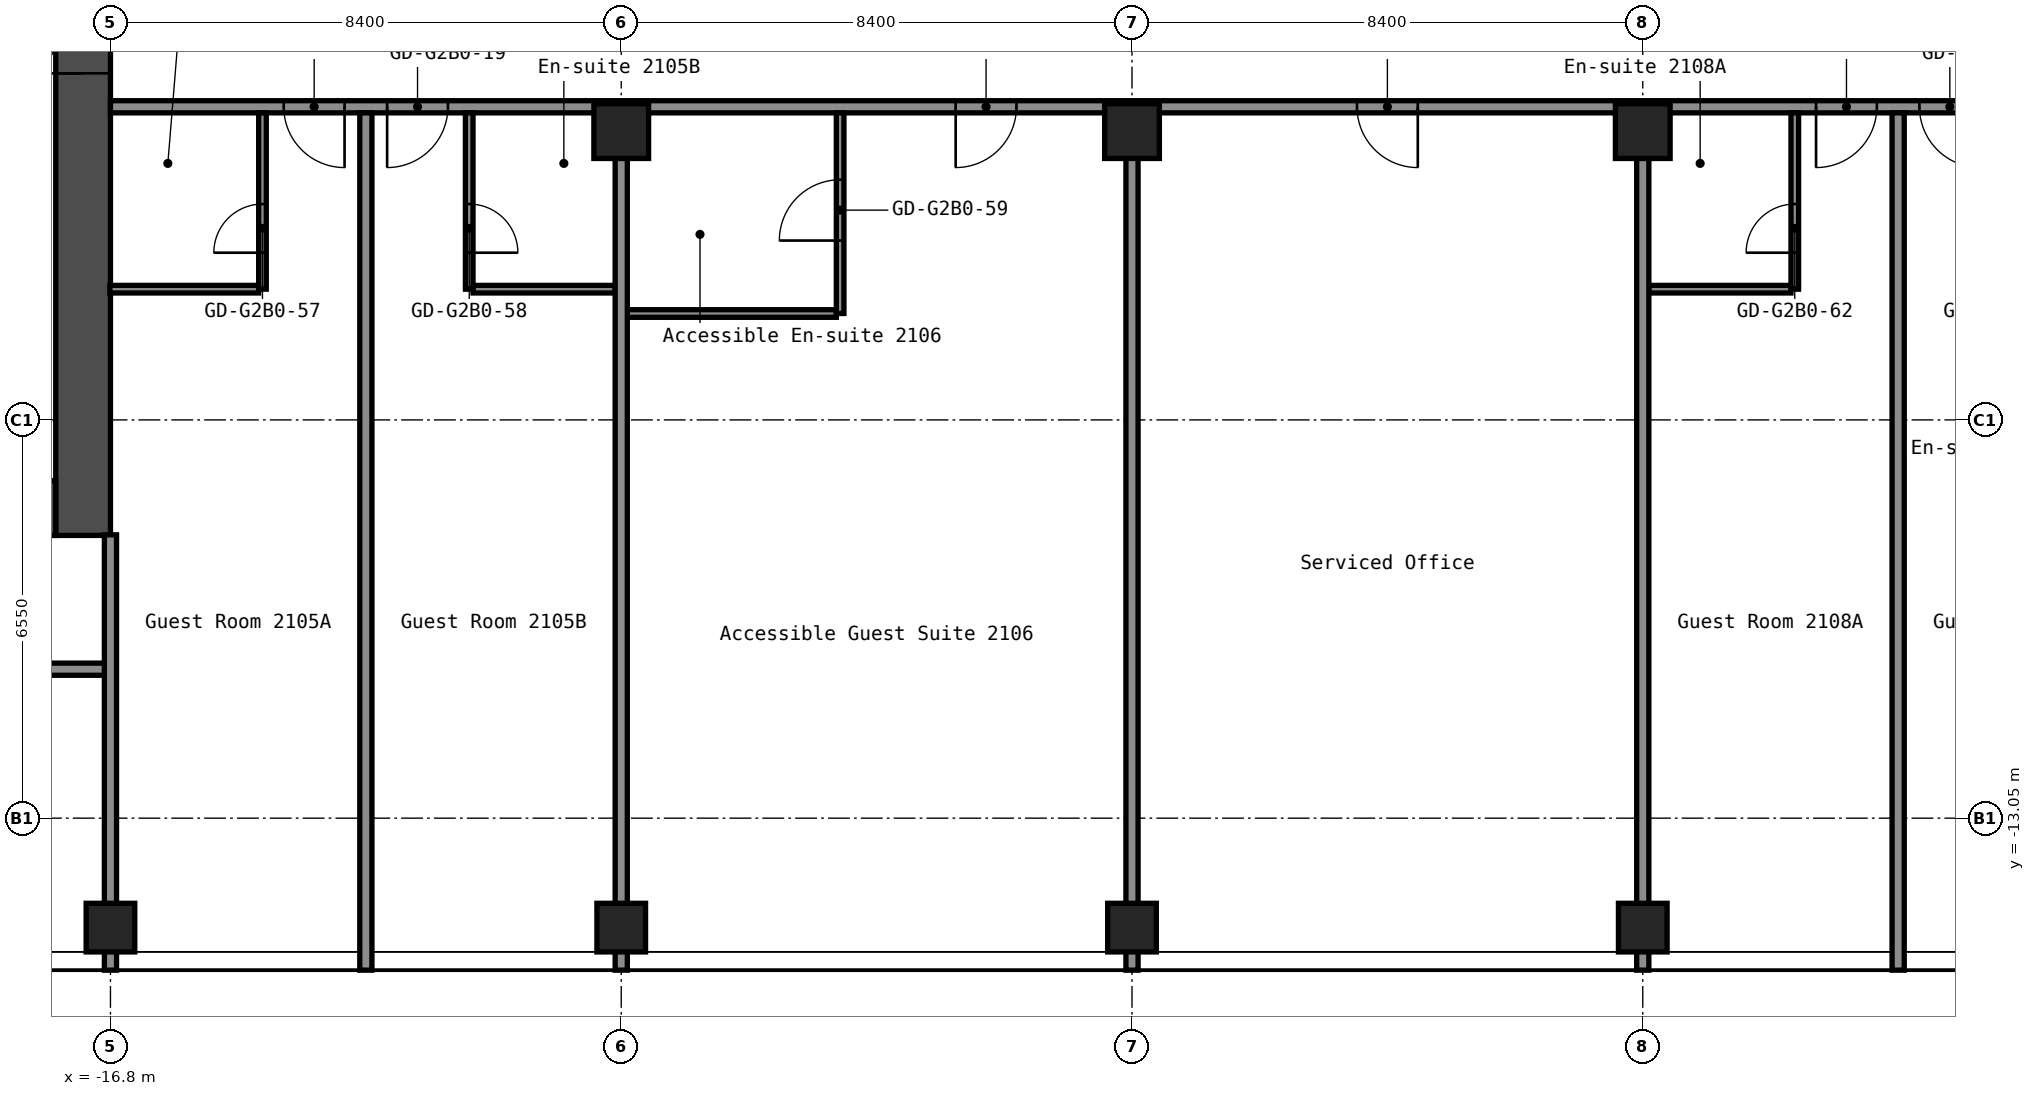
"""IFC4 building model, lengths in metres.
Left out: names, types, materials, properties, quantities, classifications, styles, units other than length and angle.
Written with IfcOpenShell. Run it as: python <this file> out.ifc"""

import sys

from ifc_helpers import new_model, si_unit, direction, frame, frame_2d, origin, origin_2d, place, context, subcontext, project, spatial, rectangle, hollow_rectangle, extrude, element, fill, save


model = new_model("IFC4")
c1 = context("Model", 3, precision=1e-05, world=origin(), true_north=direction((0.0, 1.0)))
c2 = subcontext(c1, "Body", "Model", "MODEL_VIEW")
j1 = project(units=[si_unit("LENGTHUNIT", "METRE"), si_unit("PLANEANGLEUNIT", "RADIAN")], contexts=[c1])
p1 = place(None, origin())
s1 = spatial("IfcSite", under=j1, at=p1, CompositionType="ELEMENT")
p2 = place(p1, origin())
s2 = spatial("IfcBuilding", under=s1, at=p2, CompositionType="ELEMENT")
p3 = place(p2, frame((0.0, 0.0, 78.6)))
s3 = spatial("IfcBuildingStorey", under=s2, at=p3, CompositionType="ELEMENT", Elevation=78.6)
for number, where, z_axis, x_axis in (
    (1, (-16.8, -14.85, 0.0), (0.0, 0.0, 1.0), (1.0, 0.0, 0.0)),
    (2, (-8.4, -14.85, 0.0), (0.0, 0.0, 1.0), (1.0, 0.0, 0.0)),
):
    element("IfcColumn", number, at=place(p3, frame(where, z_axis=z_axis, x_axis=x_axis)), inside=s3, PredefinedType="COLUMN", context=c2, shape_type="SweptSolid", body=[
        extrude(hollow_rectangle(XDim=0.8, YDim=0.8, WallThickness=0.032, at=origin_2d()), origin(), (0.0, 0.0, 1.0), 2.8),
    ])
p4 = place(p3, frame((-8.4, -1.75, 0.0), z_axis=(0.0, 0.0, 1.0), x_axis=(1.0, 0.0, 0.0)))
e3 = element("IfcColumn", 3, at=p4, inside=s3, PredefinedType="COLUMN", context=c2, shape_type="SweptSolid", body=[
    extrude(hollow_rectangle(XDim=0.9, YDim=0.9, WallThickness=0.036, at=origin_2d()), origin(), (0.0, 0.0, 1.0), 2.8),
])
p5 = place(p3, frame((0.0, -14.85, 0.0), z_axis=(0.0, 0.0, 1.0), x_axis=(1.0, 0.0, 0.0)))
e4 = element("IfcColumn", 4, at=p5, inside=s3, PredefinedType="COLUMN", context=c2, shape_type="SweptSolid", body=[
    extrude(hollow_rectangle(XDim=0.8, YDim=0.8, WallThickness=0.032, at=origin_2d()), origin(), (0.0, 0.0, 1.0), 2.8),
])
p6 = place(p3, frame((0.0, -1.75, 0.0), z_axis=(0.0, 0.0, 1.0), x_axis=(1.0, 0.0, 0.0)))
e5 = element("IfcColumn", 5, at=p6, inside=s3, PredefinedType="COLUMN", context=c2, shape_type="SweptSolid", body=[
    extrude(hollow_rectangle(XDim=0.9, YDim=0.9, WallThickness=0.036, at=origin_2d()), origin(), (0.0, 0.0, 1.0), 2.8),
])
p7 = place(p3, frame((8.4, -14.85, 0.0), z_axis=(0.0, 0.0, 1.0), x_axis=(1.0, 0.0, 0.0)))
e6 = element("IfcColumn", 6, at=p7, inside=s3, PredefinedType="COLUMN", context=c2, shape_type="SweptSolid", body=[
    extrude(hollow_rectangle(XDim=0.8, YDim=0.8, WallThickness=0.032, at=origin_2d()), origin(), (0.0, 0.0, 1.0), 2.8),
])
p8 = place(p3, frame((8.4, -1.75, 0.0), z_axis=(0.0, 0.0, 1.0), x_axis=(1.0, 0.0, 0.0)))
e7 = element("IfcColumn", 7, at=p8, inside=s3, PredefinedType="COLUMN", context=c2, shape_type="SweptSolid", body=[
    extrude(hollow_rectangle(XDim=0.9, YDim=0.9, WallThickness=0.036, at=origin_2d()), origin(), (0.0, 0.0, 1.0), 2.8),
])
p9 = place(p3, frame((-17.25, -8.4, 0.0), z_axis=(0.0, 0.0, 1.0), x_axis=(0.0, 1.0, 0.0)))
e8 = element("IfcWall", 8, at=p9, inside=s3, PredefinedType="SHEAR", context=c2, shape_type="SweptSolid", body=[
    extrude(rectangle(XDim=16.8, YDim=0.9, at=frame_2d((8.4, 0.0))), origin(), (0.0, 0.0, 1.0), 2.8),
])
p10 = place(p9, frame((7.6, 0.0, 0.0)))
e9 = element("IfcOpeningElement", 9, at=p10, cuts=e8, PredefinedType="OPENING", context=c2, shape_type="SweptSolid", body=[
    extrude(rectangle(XDim=1.2, YDim=2.1, at=frame_2d((0.6, 1.05))), frame((0.0, 0.46, 0.0), z_axis=(0.0, -1.0, 0.0), x_axis=(1.0, 0.0, 0.0)), (0.0, 0.0, 1.0), 0.92),
])
p11 = place(p3, frame((-32.7, -7.95, 0.0), z_axis=(0.0, 0.0, 1.0), x_axis=(1.0, 0.0, 0.0)))
e10 = element("IfcWall", 10, at=p11, inside=s3, PredefinedType="SHEAR", context=c2, shape_type="SweptSolid", body=[
    extrude(rectangle(XDim=15.0, YDim=0.9, at=frame_2d((7.5, 0.0))), origin(), (0.0, 0.0, 1.0), 2.8),
])
p12 = place(p11, frame((11.45, 0.0, 0.0)))
e11 = element("IfcOpeningElement", 11, at=p12, cuts=e10, PredefinedType="OPENING", context=c2, shape_type="SweptSolid", body=[
    extrude(rectangle(XDim=1.0, YDim=2.1, at=frame_2d((0.5, 1.05))), frame((0.0, 0.46, 0.0), z_axis=(0.0, -1.0, 0.0), x_axis=(1.0, 0.0, 0.0)), (0.0, 0.0, 1.0), 0.92),
])
p13 = place(p3, frame((-46.5, -10.6, 0.0), z_axis=(0.0, 0.0, 1.0), x_axis=(1.0, 0.0, 0.0)))
e12 = element("IfcWall", 12, at=p13, inside=s3, PredefinedType="PARTITIONING", context=c2, shape_type="SweptSolid", body=[
    extrude(rectangle(XDim=29.7, YDim=0.2, at=frame_2d((14.85, 0.0))), origin(), (0.0, 0.0, 1.0), 2.8),
])
p14 = place(p13, frame((1.95, 0.0, 0.0)))
e13 = element("IfcOpeningElement", 13, at=p14, cuts=e12, PredefinedType="OPENING", context=c2, shape_type="SweptSolid", body=[
    extrude(rectangle(XDim=0.9, YDim=2.1, at=frame_2d((0.45, 1.05))), frame((0.0, 0.11, 0.0), z_axis=(0.0, -1.0, 0.0), x_axis=(1.0, 0.0, 0.0)), (0.0, 0.0, 1.0), 0.22),
])
p15 = place(p13, frame((6.57, 0.0, 0.0)))
e14 = element("IfcOpeningElement", 14, at=p15, cuts=e12, PredefinedType="OPENING", context=c2, shape_type="SweptSolid", body=[
    extrude(rectangle(XDim=0.9, YDim=2.1, at=frame_2d((0.45, 1.05))), frame((0.0, 0.11, 0.0), z_axis=(0.0, -1.0, 0.0), x_axis=(1.0, 0.0, 0.0)), (0.0, 0.0, 1.0), 0.22),
])
p16 = place(p13, frame((10.77, 0.0, 0.0)))
e15 = element("IfcOpeningElement", 15, at=p16, cuts=e12, PredefinedType="OPENING", context=c2, shape_type="SweptSolid", body=[
    extrude(rectangle(XDim=0.9, YDim=2.1, at=frame_2d((0.45, 1.05))), frame((0.0, 0.11, 0.0), z_axis=(0.0, -1.0, 0.0), x_axis=(1.0, 0.0, 0.0)), (0.0, 0.0, 1.0), 0.22),
])
p17 = place(p13, frame((14.72, 0.0, 0.0)))
e16 = element("IfcOpeningElement", 16, at=p17, cuts=e12, PredefinedType="OPENING", context=c2, shape_type="SweptSolid", body=[
    extrude(rectangle(XDim=0.9, YDim=2.1, at=frame_2d((0.45, 1.05))), frame((0.0, 0.11, 0.0), z_axis=(0.0, -1.0, 0.0), x_axis=(1.0, 0.0, 0.0)), (0.0, 0.0, 1.0), 0.22),
])
p18 = place(p13, frame((18.92, 0.0, 0.0)))
e17 = element("IfcOpeningElement", 17, at=p18, cuts=e12, PredefinedType="OPENING", context=c2, shape_type="SweptSolid", body=[
    extrude(rectangle(XDim=0.9, YDim=2.1, at=frame_2d((0.45, 1.05))), frame((0.0, 0.11, 0.0), z_axis=(0.0, -1.0, 0.0), x_axis=(1.0, 0.0, 0.0)), (0.0, 0.0, 1.0), 0.22),
])
p19 = place(p13, frame((25.0, 0.0, 0.0)))
e18 = element("IfcOpeningElement", 18, at=p19, cuts=e12, PredefinedType="OPENING", context=c2, shape_type="SweptSolid", body=[
    extrude(rectangle(XDim=1.0, YDim=2.1, at=frame_2d((0.5, 1.05))), frame((0.0, 0.11, 0.0), z_axis=(0.0, -1.0, 0.0), x_axis=(1.0, 0.0, 0.0)), (0.0, 0.0, 1.0), 0.22),
])
p20 = place(p3, frame((-8.3, -4.75, 0.0), z_axis=(0.0, 0.0, 1.0), x_axis=(1.0, 0.0, 0.0)))
e19 = element("IfcWall", 19, at=p20, inside=s3, PredefinedType="PARTITIONING", context=c2, shape_type="SweptSolid", body=[
    extrude(rectangle(XDim=3.438, YDim=0.125, at=frame_2d((1.719, 0.0))), origin(), (0.0, 0.0, 1.0), 2.8),
])
p21 = place(p3, frame((-16.81, -4.35, 0.0), z_axis=(0.0, 0.0, 1.0), x_axis=(1.0, 0.0, 0.0)))
e20 = element("IfcWall", 20, at=p21, inside=s3, PredefinedType="PARTITIONING", context=c2, shape_type="SweptSolid", body=[
    extrude(rectangle(XDim=2.448, YDim=0.125, at=frame_2d((1.224, 0.0))), origin(), (0.0, 0.0, 1.0), 2.8),
])
for number, where, z_axis, x_axis in (
    (21, (-10.837, -4.35, 0.0), (0.0, 0.0, 1.0), (1.0, 0.0, 0.0)),
    (22, (8.5, -4.35, 0.0), (0.0, 0.0, 1.0), (1.0, 0.0, 0.0)),
):
    element("IfcWall", number, at=place(p3, frame(where, z_axis=z_axis, x_axis=x_axis)), inside=s3, PredefinedType="PARTITIONING", context=c2, shape_type="SweptSolid", body=[
        extrude(rectangle(XDim=2.337, YDim=0.125, at=frame_2d((1.169, 0.0))), origin(), (0.0, 0.0, 1.0), 2.8),
    ])
p22 = place(p3, frame((-16.8, -1.35, 0.0), z_axis=(0.0, 0.0, 1.0), x_axis=(1.0, 0.0, 0.0)))
e23 = element("IfcWall", 23, at=p22, inside=s3, PredefinedType="PARTITIONING", context=c2, shape_type="SweptSolid", body=[
    extrude(rectangle(XDim=33.6, YDim=0.2, at=frame_2d((16.8, 0.0))), origin(), (0.0, 0.0, 1.0), 2.8),
])
p23 = place(p22, frame((2.85, 0.0, 0.0)))
e24 = element("IfcOpeningElement", 24, at=p23, cuts=e23, PredefinedType="OPENING", context=c2, shape_type="SweptSolid", body=[
    extrude(rectangle(XDim=1.0, YDim=2.1, at=frame_2d((0.5, 1.05))), frame((0.0, 0.11, 0.0), z_axis=(0.0, -1.0, 0.0), x_axis=(1.0, 0.0, 0.0)), (0.0, 0.0, 1.0), 0.22),
])
p24 = place(p22, frame((4.55, 0.0, 0.0)))
e25 = element("IfcOpeningElement", 25, at=p24, cuts=e23, PredefinedType="OPENING", context=c2, shape_type="SweptSolid", body=[
    extrude(rectangle(XDim=1.0, YDim=2.1, at=frame_2d((0.5, 1.05))), frame((0.0, 0.11, 0.0), z_axis=(0.0, -1.0, 0.0), x_axis=(1.0, 0.0, 0.0)), (0.0, 0.0, 1.0), 0.22),
])
p25 = place(p22, frame((13.9, 0.0, 0.0)))
e26 = element("IfcOpeningElement", 26, at=p25, cuts=e23, PredefinedType="OPENING", context=c2, shape_type="SweptSolid", body=[
    extrude(rectangle(XDim=1.0, YDim=2.1, at=frame_2d((0.5, 1.05))), frame((0.0, 0.11, 0.0), z_axis=(0.0, -1.0, 0.0), x_axis=(1.0, 0.0, 0.0)), (0.0, 0.0, 1.0), 0.22),
])
p26 = place(p22, frame((20.5, 0.0, 0.0)))
e27 = element("IfcOpeningElement", 27, at=p26, cuts=e23, PredefinedType="OPENING", context=c2, shape_type="SweptSolid", body=[
    extrude(rectangle(XDim=1.0, YDim=2.1, at=frame_2d((0.5, 1.05))), frame((0.0, 0.11, 0.0), z_axis=(0.0, -1.0, 0.0), x_axis=(1.0, 0.0, 0.0)), (0.0, 0.0, 1.0), 0.22),
])
p27 = place(p22, frame((28.05, 0.0, 0.0)))
e28 = element("IfcOpeningElement", 28, at=p27, cuts=e23, PredefinedType="OPENING", context=c2, shape_type="SweptSolid", body=[
    extrude(rectangle(XDim=1.0, YDim=2.1, at=frame_2d((0.5, 1.05))), frame((0.0, 0.11, 0.0), z_axis=(0.0, -1.0, 0.0), x_axis=(1.0, 0.0, 0.0)), (0.0, 0.0, 1.0), 0.22),
])
p28 = place(p22, frame((29.75, 0.0, 0.0)))
e29 = element("IfcOpeningElement", 29, at=p28, cuts=e23, PredefinedType="OPENING", context=c2, shape_type="SweptSolid", body=[
    extrude(rectangle(XDim=1.0, YDim=2.1, at=frame_2d((0.5, 1.05))), frame((0.0, 0.11, 0.0), z_axis=(0.0, -1.0, 0.0), x_axis=(1.0, 0.0, 0.0)), (0.0, 0.0, 1.0), 0.22),
])
p29 = place(p3, frame((-16.8, -15.55, 0.0), z_axis=(0.0, 0.0, 1.0), x_axis=(0.0, 1.0, 0.0)))
e30 = element("IfcWall", 30, at=p29, inside=s3, PredefinedType="PARTITIONING", context=c2, shape_type="SweptSolid", body=[
    extrude(rectangle(XDim=7.16, YDim=0.2, at=frame_2d((3.58, 0.0))), origin(), (0.0, 0.0, 1.0), 2.8),
])
p30 = place(p3, frame((-14.3, -4.35, 0.0), z_axis=(0.0, 0.0, 1.0), x_axis=(0.0, 1.0, 0.0)))
e31 = element("IfcWall", 31, at=p30, inside=s3, PredefinedType="PARTITIONING", context=c2, shape_type="SweptSolid", body=[
    extrude(rectangle(XDim=2.9, YDim=0.125, at=frame_2d((1.45, 0.0))), origin(), (0.0, 0.0, 1.0), 2.8),
])
p31 = place(p30, frame((0.6, 0.0, 0.0)))
e32 = element("IfcOpeningElement", 32, at=p31, cuts=e31, PredefinedType="OPENING", context=c2, shape_type="SweptSolid", body=[
    extrude(rectangle(XDim=0.8, YDim=2.1, at=frame_2d((0.4, 1.05))), frame((0.0, 0.073, 0.0), z_axis=(0.0, -1.0, 0.0), x_axis=(1.0, 0.0, 0.0)), (0.0, 0.0, 1.0), 0.145),
])
p32 = place(p3, frame((-12.6, -15.55, 0.0), z_axis=(0.0, 0.0, 1.0), x_axis=(0.0, 1.0, 0.0)))
e33 = element("IfcWall", 33, at=p32, inside=s3, PredefinedType="PARTITIONING", context=c2, shape_type="SweptSolid", body=[
    extrude(rectangle(XDim=14.1, YDim=0.2, at=frame_2d((7.05, 0.0))), origin(), (0.0, 0.0, 1.0), 2.8),
])
p33 = place(p3, frame((-10.9, -4.35, 0.0), z_axis=(0.0, 0.0, 1.0), x_axis=(0.0, 1.0, 0.0)))
e34 = element("IfcWall", 34, at=p33, inside=s3, PredefinedType="PARTITIONING", context=c2, shape_type="SweptSolid", body=[
    extrude(rectangle(XDim=2.9, YDim=0.125, at=frame_2d((1.45, 0.0))), origin(), (0.0, 0.0, 1.0), 2.8),
])
p34 = place(p33, frame((0.6, 0.0, 0.0)))
e35 = element("IfcOpeningElement", 35, at=p34, cuts=e34, PredefinedType="OPENING", context=c2, shape_type="SweptSolid", body=[
    extrude(rectangle(XDim=0.8, YDim=2.1, at=frame_2d((0.4, 1.05))), frame((0.0, 0.073, 0.0), z_axis=(0.0, -1.0, 0.0), x_axis=(1.0, 0.0, 0.0)), (0.0, 0.0, 1.0), 0.145),
])
p35 = place(p3, frame((-8.4, -15.55, 0.0), z_axis=(0.0, 0.0, 1.0), x_axis=(0.0, 1.0, 0.0)))
e36 = element("IfcWall", 36, at=p35, inside=s3, PredefinedType="PARTITIONING", context=c2, shape_type="SweptSolid", body=[
    extrude(rectangle(XDim=13.36, YDim=0.2, at=frame_2d((6.68, 0.0))), origin(), (0.0, 0.0, 1.0), 2.8),
])
p36 = place(p3, frame((-4.8, -4.75, 0.0), z_axis=(0.0, 0.0, 1.0), x_axis=(0.0, 1.0, 0.0)))
e37 = element("IfcWall", 37, at=p36, inside=s3, PredefinedType="PARTITIONING", context=c2, shape_type="SweptSolid", body=[
    extrude(rectangle(XDim=3.3, YDim=0.125, at=frame_2d((1.65, 0.0))), origin(), (0.0, 0.0, 1.0), 2.8),
])
p37 = place(p36, frame((1.2, 0.0, 0.0)))
e38 = element("IfcOpeningElement", 38, at=p37, cuts=e37, PredefinedType="OPENING", context=c2, shape_type="SweptSolid", body=[
    extrude(rectangle(XDim=1.0, YDim=2.1, at=frame_2d((0.5, 1.05))), frame((0.0, 0.073, 0.0), z_axis=(0.0, -1.0, 0.0), x_axis=(1.0, 0.0, 0.0)), (0.0, 0.0, 1.0), 0.145),
])
for number, where, z_axis, x_axis in (
    (39, (0.0, -15.55, 0.0), (0.0, 0.0, 1.0), (0.0, 1.0, 0.0)),
    (40, (8.4, -15.55, 0.0), (0.0, 0.0, 1.0), (0.0, 1.0, 0.0)),
):
    element("IfcWall", number, at=place(p3, frame(where, z_axis=z_axis, x_axis=x_axis)), inside=s3, PredefinedType="PARTITIONING", context=c2, shape_type="SweptSolid", body=[
        extrude(rectangle(XDim=13.36, YDim=0.2, at=frame_2d((6.68, 0.0))), origin(), (0.0, 0.0, 1.0), 2.8),
    ])
p38 = place(p3, frame((10.9, -4.35, 0.0), z_axis=(0.0, 0.0, 1.0), x_axis=(0.0, 1.0, 0.0)))
e41 = element("IfcWall", 41, at=p38, inside=s3, PredefinedType="PARTITIONING", context=c2, shape_type="SweptSolid", body=[
    extrude(rectangle(XDim=2.9, YDim=0.125, at=frame_2d((1.45, 0.0))), origin(), (0.0, 0.0, 1.0), 2.8),
])
p39 = place(p38, frame((0.6, 0.0, 0.0)))
e42 = element("IfcOpeningElement", 42, at=p39, cuts=e41, PredefinedType="OPENING", context=c2, shape_type="SweptSolid", body=[
    extrude(rectangle(XDim=0.8, YDim=2.1, at=frame_2d((0.4, 1.05))), frame((0.0, 0.073, 0.0), z_axis=(0.0, -1.0, 0.0), x_axis=(1.0, 0.0, 0.0)), (0.0, 0.0, 1.0), 0.145),
])
p40 = place(p3, frame((12.6, -15.55, 0.0), z_axis=(0.0, 0.0, 1.0), x_axis=(0.0, 1.0, 0.0)))
e43 = element("IfcWall", 43, at=p40, inside=s3, PredefinedType="PARTITIONING", context=c2, shape_type="SweptSolid", body=[
    extrude(rectangle(XDim=14.1, YDim=0.2, at=frame_2d((7.05, 0.0))), origin(), (0.0, 0.0, 1.0), 2.8),
])
p41 = place(p10, origin())
e44 = element("IfcDoor", 44, at=p41, inside=s3, OperationType="DOUBLE_DOOR_SINGLE_SWING", PredefinedType="DOOR", context=c2, shape_type="SweptSolid", body=[
    extrude(rectangle(XDim=1.2, YDim=2.1, at=frame_2d((0.6, 1.05))), frame((0.0, 0.025, 0.0), z_axis=(0.0, -1.0, 0.0), x_axis=(1.0, 0.0, 0.0)), (0.0, 0.0, 1.0), 0.05),
])
fill(e9, e44)
p42 = place(p23, origin())
e45 = element("IfcDoor", 45, at=p42, inside=s3, OperationType="SINGLE_SWING_RIGHT", PredefinedType="DOOR", context=c2, shape_type="SweptSolid", body=[
    extrude(rectangle(XDim=1.0, YDim=2.1, at=frame_2d((0.5, 1.05))), frame((0.0, 0.025, 0.0), z_axis=(0.0, -1.0, 0.0), x_axis=(1.0, 0.0, 0.0)), (0.0, 0.0, 1.0), 0.05),
])
fill(e24, e45)
p43 = place(p24, origin())
e46 = element("IfcDoor", 46, at=p43, inside=s3, OperationType="SINGLE_SWING_LEFT", PredefinedType="DOOR", context=c2, shape_type="SweptSolid", body=[
    extrude(rectangle(XDim=1.0, YDim=2.1, at=frame_2d((0.5, 1.05))), frame((0.0, 0.025, 0.0), z_axis=(0.0, -1.0, 0.0), x_axis=(1.0, 0.0, 0.0)), (0.0, 0.0, 1.0), 0.05),
])
fill(e25, e46)
p44 = place(p25, origin())
e47 = element("IfcDoor", 47, at=p44, inside=s3, OperationType="SINGLE_SWING_LEFT", PredefinedType="DOOR", context=c2, shape_type="SweptSolid", body=[
    extrude(rectangle(XDim=1.0, YDim=2.1, at=frame_2d((0.5, 1.05))), frame((0.0, 0.025, 0.0), z_axis=(0.0, -1.0, 0.0), x_axis=(1.0, 0.0, 0.0)), (0.0, 0.0, 1.0), 0.05),
])
fill(e26, e47)
p45 = place(p26, origin())
e48 = element("IfcDoor", 48, at=p45, inside=s3, OperationType="SINGLE_SWING_RIGHT", PredefinedType="DOOR", context=c2, shape_type="SweptSolid", body=[
    extrude(rectangle(XDim=1.0, YDim=2.1, at=frame_2d((0.5, 1.05))), frame((0.0, 0.025, 0.0), z_axis=(0.0, -1.0, 0.0), x_axis=(1.0, 0.0, 0.0)), (0.0, 0.0, 1.0), 0.05),
])
fill(e27, e48)
p46 = place(p27, origin())
e49 = element("IfcDoor", 49, at=p46, inside=s3, OperationType="SINGLE_SWING_LEFT", PredefinedType="DOOR", context=c2, shape_type="SweptSolid", body=[
    extrude(rectangle(XDim=1.0, YDim=2.1, at=frame_2d((0.5, 1.05))), frame((0.0, 0.025, 0.0), z_axis=(0.0, -1.0, 0.0), x_axis=(1.0, 0.0, 0.0)), (0.0, 0.0, 1.0), 0.05),
])
fill(e28, e49)
p47 = place(p28, origin())
e50 = element("IfcDoor", 50, at=p47, inside=s3, OperationType="SINGLE_SWING_RIGHT", PredefinedType="DOOR", context=c2, shape_type="SweptSolid", body=[
    extrude(rectangle(XDim=1.0, YDim=2.1, at=frame_2d((0.5, 1.05))), frame((0.0, 0.025, 0.0), z_axis=(0.0, -1.0, 0.0), x_axis=(1.0, 0.0, 0.0)), (0.0, 0.0, 1.0), 0.05),
])
fill(e29, e50)
p48 = place(p31, origin())
e51 = element("IfcDoor", 51, at=p48, inside=s3, OperationType="SINGLE_SWING_RIGHT", PredefinedType="DOOR", context=c2, shape_type="SweptSolid", body=[
    extrude(rectangle(XDim=0.8, YDim=2.1, at=frame_2d((0.4, 1.05))), frame((0.0, 0.025, 0.0), z_axis=(0.0, -1.0, 0.0), x_axis=(1.0, 0.0, 0.0)), (0.0, 0.0, 1.0), 0.05),
])
fill(e32, e51)
p49 = place(p34, origin())
e52 = element("IfcDoor", 52, at=p49, inside=s3, OperationType="SINGLE_SWING_LEFT", PredefinedType="DOOR", context=c2, shape_type="SweptSolid", body=[
    extrude(rectangle(XDim=0.8, YDim=2.1, at=frame_2d((0.4, 1.05))), frame((0.0, 0.025, 0.0), z_axis=(0.0, -1.0, 0.0), x_axis=(1.0, 0.0, 0.0)), (0.0, 0.0, 1.0), 0.05),
])
fill(e35, e52)
p50 = place(p37, origin())
e53 = element("IfcDoor", 53, at=p50, inside=s3, OperationType="SINGLE_SWING_RIGHT", PredefinedType="DOOR", context=c2, shape_type="SweptSolid", body=[
    extrude(rectangle(XDim=1.0, YDim=2.1, at=frame_2d((0.5, 1.05))), frame((0.0, 0.025, 0.0), z_axis=(0.0, -1.0, 0.0), x_axis=(1.0, 0.0, 0.0)), (0.0, 0.0, 1.0), 0.05),
])
fill(e38, e53)
p51 = place(p39, origin())
e54 = element("IfcDoor", 54, at=p51, inside=s3, OperationType="SINGLE_SWING_RIGHT", PredefinedType="DOOR", context=c2, shape_type="SweptSolid", body=[
    extrude(rectangle(XDim=0.8, YDim=2.1, at=frame_2d((0.4, 1.05))), frame((0.0, 0.025, 0.0), z_axis=(0.0, -1.0, 0.0), x_axis=(1.0, 0.0, 0.0)), (0.0, 0.0, 1.0), 0.05),
])
fill(e42, e54)
save(model, sys.argv[1])
